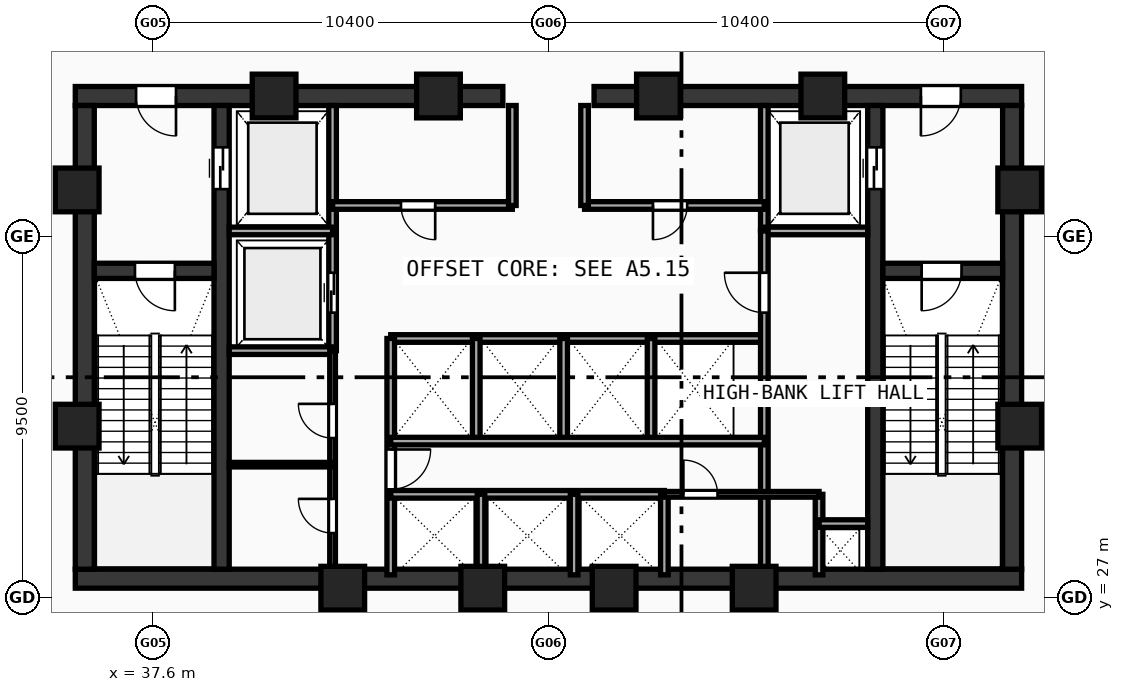
"""IFC4 building model, lengths in metres.
Left out: names, types, materials, properties, quantities, classifications, styles, units other than length and angle.
Written with IfcOpenShell. Run it as: python <this file> out.ifc"""

import sys

from ifc_helpers import new_model, si_unit, direction, frame, frame_2d, origin, origin_with_axes, origin_2d, place, context, subcontext, project, spatial, rectangle, hollow_rectangle, extrude, source, transform, mapped, element, fill, save


model = new_model("IFC4")
c1 = context("Model", 3, precision=1e-05, world=origin(), true_north=direction((0.0, 1.0)))
c2 = subcontext(c1, "Body", "Model", "MODEL_VIEW")
j1 = project(units=[si_unit("LENGTHUNIT", "METRE"), si_unit("PLANEANGLEUNIT", "RADIAN")], contexts=[c1])
p1 = place(None, origin())
s1 = spatial("IfcSite", under=j1, at=p1, CompositionType="ELEMENT")
p2 = place(p1, origin())
s2 = spatial("IfcBuilding", under=s1, at=p2, CompositionType="ELEMENT")
p3 = place(p2, frame((0.0, 0.0, 224.81)))
s3 = spatial("IfcBuildingStorey", under=s2, at=p3, CompositionType="ELEMENT", Elevation=224.81)
p4 = place(p3, frame((35.55, 27.5, 0.0), z_axis=(0.0, 0.0, 1.0), x_axis=(1.0, 0.0, 0.0)))
e1 = element("IfcWall", 1, at=p4, inside=s3, PredefinedType="SHEAR", context=c2, shape_type="SweptSolid", body=[
    extrude(rectangle(XDim=24.9, YDim=0.5, at=frame_2d((12.45, 0.0))), origin(), (0.0, 0.0, 1.0), 4.54),
])
p5 = place(p3, frame((35.55, 40.2, 0.0), z_axis=(0.0, 0.0, 1.0), x_axis=(1.0, 0.0, 0.0)))
e2 = element("IfcWall", 2, at=p5, inside=s3, PredefinedType="SHEAR", context=c2, shape_type="SweptSolid", body=[
    extrude(rectangle(XDim=11.25, YDim=0.5, at=frame_2d((5.625, 0.0))), origin(), (0.0, 0.0, 1.0), 4.54),
])
p6 = place(p5, frame((1.6, 0.0, 0.0)))
e3 = element("IfcOpeningElement", 3, at=p6, cuts=e2, PredefinedType="OPENING", context=c2, shape_type="SweptSolid", body=[
    extrude(rectangle(XDim=1.05, YDim=2.1, at=frame_2d((0.525, 1.05))), frame((0.0, 0.26, 0.0), z_axis=(0.0, -1.0, 0.0), x_axis=(1.0, 0.0, 0.0)), (0.0, 0.0, 1.0), 0.52),
])
p7 = place(p3, frame((49.2, 40.2, 0.0), z_axis=(0.0, 0.0, 1.0), x_axis=(1.0, 0.0, 0.0)))
e4 = element("IfcWall", 4, at=p7, inside=s3, PredefinedType="SHEAR", context=c2, shape_type="SweptSolid", body=[
    extrude(rectangle(XDim=11.25, YDim=0.5, at=frame_2d((5.625, 0.0))), origin(), (0.0, 0.0, 1.0), 4.54),
])
p8 = place(p7, frame((8.6, 0.0, 0.0)))
e5 = element("IfcOpeningElement", 5, at=p8, cuts=e4, PredefinedType="OPENING", context=c2, shape_type="SweptSolid", body=[
    extrude(rectangle(XDim=1.05, YDim=2.1, at=frame_2d((0.525, 1.05))), frame((0.0, 0.26, 0.0), z_axis=(0.0, -1.0, 0.0), x_axis=(1.0, 0.0, 0.0)), (0.0, 0.0, 1.0), 0.52),
])
for number, where, z_axis, x_axis in (
    (6, (35.8, 27.75, 0.0), (0.0, 0.0, 1.0), (0.0, 1.0, 0.0)),
    (7, (60.2, 27.75, 0.0), (0.0, 0.0, 1.0), (0.0, 1.0, 0.0)),
):
    element("IfcWall", number, at=place(p3, frame(where, z_axis=z_axis, x_axis=x_axis)), inside=s3, PredefinedType="SHEAR", context=c2, shape_type="SweptSolid", body=[
        extrude(rectangle(XDim=12.2, YDim=0.5, at=frame_2d((6.1, 0.0))), origin(), (0.0, 0.0, 1.0), 4.54),
    ])
p9 = place(p3, frame((39.4, 27.75, 0.0), z_axis=(0.0, 0.0, 1.0), x_axis=(0.0, 1.0, 0.0)))
e8 = element("IfcWall", 8, at=p9, inside=s3, PredefinedType="SHEAR", context=c2, shape_type="SweptSolid", body=[
    extrude(rectangle(XDim=12.2, YDim=0.4, at=frame_2d((6.1, 0.0))), origin(), (0.0, 0.0, 1.0), 4.54),
])
p10 = place(p9, frame((10.0, 0.0, 0.0)))
e9 = element("IfcOpeningElement", 9, at=p10, cuts=e8, PredefinedType="OPENING", context=c2, shape_type="SweptSolid", body=[
    extrude(rectangle(XDim=1.1, YDim=2.1, at=frame_2d((0.55, 1.05))), frame((0.0, 0.21, 0.0), z_axis=(0.0, -1.0, 0.0), x_axis=(1.0, 0.0, 0.0)), (0.0, 0.0, 1.0), 0.42),
])
p11 = place(p3, frame((56.6, 27.75, 0.0), z_axis=(0.0, 0.0, 1.0), x_axis=(0.0, 1.0, 0.0)))
e10 = element("IfcWall", 10, at=p11, inside=s3, PredefinedType="SHEAR", context=c2, shape_type="SweptSolid", body=[
    extrude(rectangle(XDim=12.2, YDim=0.4, at=frame_2d((6.1, 0.0))), origin(), (0.0, 0.0, 1.0), 4.54),
])
p12 = place(p11, frame((10.0, 0.0, 0.0)))
e11 = element("IfcOpeningElement", 11, at=p12, cuts=e10, PredefinedType="OPENING", context=c2, shape_type="SweptSolid", body=[
    extrude(rectangle(XDim=1.1, YDim=2.1, at=frame_2d((0.55, 1.05))), frame((0.0, 0.21, 0.0), z_axis=(0.0, -1.0, 0.0), x_axis=(1.0, 0.0, 0.0)), (0.0, 0.0, 1.0), 0.42),
])
p13 = place(p3, frame((36.05, 35.6, 0.0), z_axis=(0.0, 0.0, 1.0), x_axis=(1.0, 0.0, 0.0)))
e12 = element("IfcWall", 12, at=p13, inside=s3, PredefinedType="SHEAR", context=c2, shape_type="SweptSolid", body=[
    extrude(rectangle(XDim=3.15, YDim=0.4, at=frame_2d((1.575, 0.0))), origin(), (0.0, 0.0, 1.0), 4.54),
])
p14 = place(p13, frame((1.07, 0.0, 0.0)))
e13 = element("IfcOpeningElement", 13, at=p14, cuts=e12, PredefinedType="OPENING", context=c2, shape_type="SweptSolid", body=[
    extrude(rectangle(XDim=1.05, YDim=2.1, at=frame_2d((0.525, 1.05))), frame((0.0, 0.21, 0.0), z_axis=(0.0, -1.0, 0.0), x_axis=(1.0, 0.0, 0.0)), (0.0, 0.0, 1.0), 0.42),
])
p15 = place(p3, frame((56.8, 35.6, 0.0), z_axis=(0.0, 0.0, 1.0), x_axis=(1.0, 0.0, 0.0)))
e14 = element("IfcWall", 14, at=p15, inside=s3, PredefinedType="SHEAR", context=c2, shape_type="SweptSolid", body=[
    extrude(rectangle(XDim=3.15, YDim=0.4, at=frame_2d((1.575, 0.0))), origin(), (0.0, 0.0, 1.0), 4.54),
])
p16 = place(p15, frame((1.02, 0.0, 0.0)))
e15 = element("IfcOpeningElement", 15, at=p16, cuts=e14, PredefinedType="OPENING", context=c2, shape_type="SweptSolid", body=[
    extrude(rectangle(XDim=1.05, YDim=2.1, at=frame_2d((0.525, 1.05))), frame((0.0, 0.21, 0.0), z_axis=(0.0, -1.0, 0.0), x_axis=(1.0, 0.0, 0.0)), (0.0, 0.0, 1.0), 0.42),
])
m1 = source(origin(), c2, "Body", "SweptSolid", [
    extrude(hollow_rectangle(XDim=1.15, YDim=1.15, WallThickness=0.048, at=origin_2d()), origin(), (0.0, 0.0, 1.0), 4.82),
])
for number, where, z_axis, x_axis in (
    (16, (42.588, 27.25, -0.28), (0.0, 0.0, 1.0), (1.0, 0.0, 0.0)),
    (17, (46.272, 27.25, -0.28), (0.0, 0.0, 1.0), (1.0, 0.0, 0.0)),
    (18, (49.729, 27.25, -0.28), (0.0, 0.0, 1.0), (1.0, 0.0, 0.0)),
    (19, (53.412, 27.25, -0.28), (0.0, 0.0, 1.0), (1.0, 0.0, 0.0)),
    (20, (60.4, 31.513, -0.28), (0.0, 0.0, 1.0), (1.0, 0.0, 0.0)),
    (21, (60.4, 37.729, -0.28), (0.0, 0.0, 1.0), (1.0, 0.0, 0.0)),
    (22, (55.219, 40.2, -0.28), (0.0, 0.0, 1.0), (1.0, 0.0, 0.0)),
    (23, (50.894, 40.2, -0.28), (0.0, 0.0, 1.0), (1.0, 0.0, 0.0)),
    (24, (45.106, 40.2, -0.28), (0.0, 0.0, 1.0), (1.0, 0.0, 0.0)),
    (25, (40.781, 40.2, -0.28), (0.0, 0.0, 1.0), (1.0, 0.0, 0.0)),
    (26, (35.6, 37.729, -0.28), (0.0, 0.0, 1.0), (1.0, 0.0, 0.0)),
    (27, (35.6, 31.513, -0.28), (0.0, 0.0, 1.0), (1.0, 0.0, 0.0)),
):
    element("IfcColumn", number, at=place(p3, frame(where, z_axis=z_axis, x_axis=x_axis)), inside=s3, PredefinedType="COLUMN", context=c2, shape_type="MappedRepresentation", body=[
        mapped(m1, transform((0.0, 0.0, 0.0), scale=1.0)),
    ])
p17 = place(p3, frame((42.32, 33.5, 0.0), z_axis=(0.0, 0.0, 1.0), x_axis=(0.0, 1.0, 0.0)))
e28 = element("IfcWall", 28, at=p17, inside=s3, PredefinedType="SOLIDWALL", context=c2, shape_type="SweptSolid", body=[
    extrude(rectangle(XDim=6.45, YDim=0.2, at=frame_2d((3.225, 0.0))), origin(), (0.0, 0.0, 1.0), 4.54),
])
p18 = place(p17, frame((1.0, 0.0, 0.0)))
e29 = element("IfcOpeningElement", 29, at=p18, cuts=e28, PredefinedType="OPENING", context=c2, shape_type="SweptSolid", body=[
    extrude(rectangle(XDim=1.05, YDim=2.1, at=frame_2d((0.525, 1.05))), frame((0.0, 0.11, 0.0), z_axis=(0.0, -1.0, 0.0), x_axis=(1.0, 0.0, 0.0)), (0.0, 0.0, 1.0), 0.22),
])
for number, where, z_axis, x_axis in (
    (30, (39.6, 36.65, 0.0), (0.0, 0.0, 1.0), (1.0, 0.0, 0.0)),
    (31, (39.6, 33.5, 0.0), (0.0, 0.0, 1.0), (1.0, 0.0, 0.0)),
):
    element("IfcWall", number, at=place(p3, frame(where, z_axis=z_axis, x_axis=x_axis)), inside=s3, PredefinedType="SOLIDWALL", context=c2, shape_type="SweptSolid", body=[
        extrude(rectangle(XDim=2.72, YDim=0.2, at=frame_2d((1.36, 0.0))), origin(), (0.0, 0.0, 1.0), 4.54),
    ])
p19 = place(p3, frame((53.68, 36.65, 0.0), z_axis=(0.0, 0.0, 1.0), x_axis=(0.0, 1.0, 0.0)))
e32 = element("IfcWall", 32, at=p19, inside=s3, PredefinedType="SOLIDWALL", context=c2, shape_type="SweptSolid", body=[
    extrude(rectangle(XDim=3.3, YDim=0.2, at=frame_2d((1.65, 0.0))), origin(), (0.0, 0.0, 1.0), 4.54),
])
p20 = place(p3, frame((53.68, 36.65, 0.0), z_axis=(0.0, 0.0, 1.0), x_axis=(1.0, 0.0, 0.0)))
e33 = element("IfcWall", 33, at=p20, inside=s3, PredefinedType="SOLIDWALL", context=c2, shape_type="SweptSolid", body=[
    extrude(rectangle(XDim=2.72, YDim=0.2, at=frame_2d((1.36, 0.0))), origin(), (0.0, 0.0, 1.0), 4.54),
])
p21 = place(p3, frame((42.32, 37.32, 0.0), z_axis=(0.0, 0.0, 1.0), x_axis=(1.0, 0.0, 0.0)))
e34 = element("IfcWall", 34, at=p21, inside=s3, PredefinedType="SOLIDWALL", context=c2, shape_type="SweptSolid", body=[
    extrude(rectangle(XDim=4.73, YDim=0.2, at=frame_2d((2.365, 0.0))), origin(), (0.0, 0.0, 1.0), 4.54),
])
p22 = place(p21, frame((1.8, 0.0, 0.0)))
e35 = element("IfcOpeningElement", 35, at=p22, cuts=e34, PredefinedType="OPENING", context=c2, shape_type="SweptSolid", body=[
    extrude(rectangle(XDim=0.9, YDim=2.1, at=frame_2d((0.45, 1.05))), frame((0.0, 0.11, 0.0), z_axis=(0.0, -1.0, 0.0), x_axis=(1.0, 0.0, 0.0)), (0.0, 0.0, 1.0), 0.22),
])
p23 = place(p3, frame((48.95, 37.32, 0.0), z_axis=(0.0, 0.0, 1.0), x_axis=(1.0, 0.0, 0.0)))
e36 = element("IfcWall", 36, at=p23, inside=s3, PredefinedType="SOLIDWALL", context=c2, shape_type="SweptSolid", body=[
    extrude(rectangle(XDim=4.73, YDim=0.2, at=frame_2d((2.365, 0.0))), origin(), (0.0, 0.0, 1.0), 4.54),
])
p24 = place(p23, frame((1.8, 0.0, 0.0)))
e37 = element("IfcOpeningElement", 37, at=p24, cuts=e36, PredefinedType="OPENING", context=c2, shape_type="SweptSolid", body=[
    extrude(rectangle(XDim=0.9, YDim=2.1, at=frame_2d((0.45, 1.05))), frame((0.0, 0.11, 0.0), z_axis=(0.0, -1.0, 0.0), x_axis=(1.0, 0.0, 0.0)), (0.0, 0.0, 1.0), 0.22),
])
for number, where, z_axis, x_axis in (
    (38, (47.05, 37.32, 0.0), (0.0, 0.0, 1.0), (0.0, 1.0, 0.0)),
    (39, (48.95, 37.32, 0.0), (0.0, 0.0, 1.0), (0.0, 1.0, 0.0)),
):
    element("IfcWall", number, at=place(p3, frame(where, z_axis=z_axis, x_axis=x_axis)), inside=s3, PredefinedType="SOLIDWALL", context=c2, shape_type="SweptSolid", body=[
        extrude(rectangle(XDim=2.63, YDim=0.2, at=frame_2d((1.315, 0.0))), origin(), (0.0, 0.0, 1.0), 4.54),
    ])
p25 = place(p3, frame((43.85, 33.82, 0.0), z_axis=(0.0, 0.0, 1.0), x_axis=(1.0, 0.0, 0.0)))
e40 = element("IfcWall", 40, at=p25, inside=s3, PredefinedType="SOLIDWALL", context=c2, shape_type="SweptSolid", body=[
    extrude(rectangle(XDim=9.83, YDim=0.2, at=frame_2d((4.915, 0.0))), origin(), (0.0, 0.0, 1.0), 4.54),
])
p26 = place(p3, frame((43.85, 27.6, 0.0), z_axis=(0.0, 0.0, 1.0), x_axis=(0.0, 1.0, 0.0)))
e41 = element("IfcWall", 41, at=p26, inside=s3, PredefinedType="SOLIDWALL", context=c2, shape_type="SweptSolid", body=[
    extrude(rectangle(XDim=6.22, YDim=0.2, at=frame_2d((3.11, 0.0))), origin(), (0.0, 0.0, 1.0), 4.54),
])
p27 = place(p26, frame((2.25, 0.0, 0.0)))
e42 = element("IfcOpeningElement", 42, at=p27, cuts=e41, PredefinedType="OPENING", context=c2, shape_type="SweptSolid", body=[
    extrude(rectangle(XDim=1.05, YDim=2.1, at=frame_2d((0.525, 1.05))), frame((0.0, 0.11, 0.0), z_axis=(0.0, -1.0, 0.0), x_axis=(1.0, 0.0, 0.0)), (0.0, 0.0, 1.0), 0.22),
])
p28 = place(p3, frame((53.68, 27.6, 0.0), z_axis=(0.0, 0.0, 1.0), x_axis=(0.0, 1.0, 0.0)))
e43 = element("IfcWall", 43, at=p28, inside=s3, PredefinedType="SOLIDWALL", context=c2, shape_type="SweptSolid", body=[
    extrude(rectangle(XDim=9.05, YDim=0.2, at=frame_2d((4.525, 0.0))), origin(), (0.0, 0.0, 1.0), 4.54),
])
p29 = place(p28, frame((6.9, 0.0, 0.0)))
e44 = element("IfcOpeningElement", 44, at=p29, cuts=e43, PredefinedType="OPENING", context=c2, shape_type="SweptSolid", body=[
    extrude(rectangle(XDim=1.05, YDim=2.1, at=frame_2d((0.525, 1.05))), frame((0.0, 0.11, 0.0), z_axis=(0.0, -1.0, 0.0), x_axis=(1.0, 0.0, 0.0)), (0.0, 0.0, 1.0), 0.22),
])
for number, where, z_axis, x_axis in (
    (45, (46.1, 31.12, 0.0), (0.0, 0.0, 1.0), (0.0, 1.0, 0.0)),
    (46, (48.4, 31.12, 0.0), (0.0, 0.0, 1.0), (0.0, 1.0, 0.0)),
    (47, (50.7, 31.12, 0.0), (0.0, 0.0, 1.0), (0.0, 1.0, 0.0)),
):
    element("IfcWall", number, at=place(p3, frame(where, z_axis=z_axis, x_axis=x_axis)), inside=s3, PredefinedType="SOLIDWALL", context=c2, shape_type="SweptSolid", body=[
        extrude(rectangle(XDim=2.7, YDim=0.2, at=frame_2d((1.35, 0.0))), origin(), (0.0, 0.0, 1.0), 4.54),
    ])
p30 = place(p3, frame((43.85, 29.72, 0.0), z_axis=(0.0, 0.0, 1.0), x_axis=(1.0, 0.0, 0.0)))
e48 = element("IfcWall", 48, at=p30, inside=s3, PredefinedType="SOLIDWALL", context=c2, shape_type="SweptSolid", body=[
    extrude(rectangle(XDim=7.2, YDim=0.2, at=frame_2d((3.6, 0.0))), origin(), (0.0, 0.0, 1.0), 4.54),
])
p31 = place(p3, frame((51.05, 27.6, 0.0), z_axis=(0.0, 0.0, 1.0), x_axis=(0.0, 1.0, 0.0)))
e49 = element("IfcWall", 49, at=p31, inside=s3, PredefinedType="SOLIDWALL", context=c2, shape_type="SweptSolid", body=[
    extrude(rectangle(XDim=2.12, YDim=0.2, at=frame_2d((1.06, 0.0))), origin(), (0.0, 0.0, 1.0), 4.54),
])
p32 = place(p3, frame((43.85, 31.12, 0.0), z_axis=(0.0, 0.0, 1.0), x_axis=(1.0, 0.0, 0.0)))
e50 = element("IfcWall", 50, at=p32, inside=s3, PredefinedType="SOLIDWALL", context=c2, shape_type="SweptSolid", body=[
    extrude(rectangle(XDim=9.83, YDim=0.2, at=frame_2d((4.915, 0.0))), origin(), (0.0, 0.0, 1.0), 4.54),
])
for number, where, z_axis, x_axis in (
    (51, (46.225, 27.6, 0.0), (0.0, 0.0, 1.0), (0.0, 1.0, 0.0)),
    (52, (48.675, 27.6, 0.0), (0.0, 0.0, 1.0), (0.0, 1.0, 0.0)),
    (53, (55.12, 27.6, 0.0), (0.0, 0.0, 1.0), (0.0, 1.0, 0.0)),
):
    element("IfcWall", number, at=place(p3, frame(where, z_axis=z_axis, x_axis=x_axis)), inside=s3, PredefinedType="SOLIDWALL", context=c2, shape_type="SweptSolid", body=[
        extrude(rectangle(XDim=2.12, YDim=0.2, at=frame_2d((1.06, 0.0))), origin(), (0.0, 0.0, 1.0), 4.54),
    ])
p33 = place(p3, frame((55.12, 28.95, 0.0), z_axis=(0.0, 0.0, 1.0), x_axis=(1.0, 0.0, 0.0)))
e54 = element("IfcWall", 54, at=p33, inside=s3, PredefinedType="SOLIDWALL", context=c2, shape_type="SweptSolid", body=[
    extrude(rectangle(XDim=1.28, YDim=0.2, at=frame_2d((0.64, 0.0))), origin(), (0.0, 0.0, 1.0), 4.54),
])
p34 = place(p3, frame((42.32, 27.6, 0.0), z_axis=(0.0, 0.0, 1.0), x_axis=(0.0, 1.0, 0.0)))
e55 = element("IfcWall", 55, at=p34, inside=s3, PredefinedType="PARTITIONING", context=c2, shape_type="SweptSolid", body=[
    extrude(rectangle(XDim=5.9, YDim=0.15, at=frame_2d((2.95, 0.0))), origin(), (0.0, 0.0, 1.0), 4.54),
])
p35 = place(p34, frame((1.1, 0.0, 0.0)))
e56 = element("IfcOpeningElement", 56, at=p35, cuts=e55, PredefinedType="OPENING", context=c2, shape_type="SweptSolid", body=[
    extrude(rectangle(XDim=0.9, YDim=2.1, at=frame_2d((0.45, 1.05))), frame((0.0, 0.085, 0.0), z_axis=(0.0, -1.0, 0.0), x_axis=(1.0, 0.0, 0.0)), (0.0, 0.0, 1.0), 0.17),
])
p36 = place(p34, frame((3.6, 0.0, 0.0)))
e57 = element("IfcOpeningElement", 57, at=p36, cuts=e55, PredefinedType="OPENING", context=c2, shape_type="SweptSolid", body=[
    extrude(rectangle(XDim=0.9, YDim=2.1, at=frame_2d((0.45, 1.05))), frame((0.0, 0.085, 0.0), z_axis=(0.0, -1.0, 0.0), x_axis=(1.0, 0.0, 0.0)), (0.0, 0.0, 1.0), 0.17),
])
p37 = place(p3, frame((51.05, 29.72, 0.0), z_axis=(0.0, 0.0, 1.0), x_axis=(1.0, 0.0, 0.0)))
e58 = element("IfcWall", 58, at=p37, inside=s3, PredefinedType="PARTITIONING", context=c2, shape_type="SweptSolid", body=[
    extrude(rectangle(XDim=4.07, YDim=0.15, at=frame_2d((2.035, 0.0))), origin(), (0.0, 0.0, 1.0), 4.54),
])
p38 = place(p37, frame((0.5, 0.0, 0.0)))
e59 = element("IfcOpeningElement", 59, at=p38, cuts=e58, PredefinedType="OPENING", context=c2, shape_type="SweptSolid", body=[
    extrude(rectangle(XDim=0.9, YDim=2.1, at=frame_2d((0.45, 1.05))), frame((0.0, 0.085, 0.0), z_axis=(0.0, -1.0, 0.0), x_axis=(1.0, 0.0, 0.0)), (0.0, 0.0, 1.0), 0.17),
])
p39 = place(p3, frame((39.6, 30.5, 0.0), z_axis=(0.0, 0.0, 1.0), x_axis=(1.0, 0.0, 0.0)))
e60 = element("IfcWall", 60, at=p39, inside=s3, PredefinedType="PARTITIONING", context=c2, shape_type="SweptSolid", body=[
    extrude(rectangle(XDim=2.72, YDim=0.12, at=frame_2d((1.36, 0.0))), origin(), (0.0, 0.0, 1.0), 4.54),
])
m2 = source(origin(), c2, "Body", "SweptSolid", [
    extrude(rectangle(XDim=1.05, YDim=2.1, at=frame_2d((0.525, 1.05))), frame((0.0, 0.025, 0.0), z_axis=(0.0, -1.0, 0.0), x_axis=(1.0, 0.0, 0.0)), (0.0, 0.0, 1.0), 0.05),
])
p40 = place(p14, frame((1.05, 0.0, 0.0), z_axis=(0.0, 0.0, 1.0), x_axis=(-1.0, 0.0, 0.0)))
e61 = element("IfcDoor", 61, at=p40, inside=s3, OperationType="SINGLE_SWING_LEFT", PredefinedType="DOOR", context=c2, shape_type="MappedRepresentation", body=[
    mapped(m2, transform((0.0, 0.0, 0.0), scale=1.0)),
])
fill(e13, e61)
p41 = place(p16, frame((1.05, 0.0, 0.0), z_axis=(0.0, 0.0, 1.0), x_axis=(-1.0, 0.0, 0.0)))
e62 = element("IfcDoor", 62, at=p41, inside=s3, OperationType="SINGLE_SWING_RIGHT", PredefinedType="DOOR", context=c2, shape_type="MappedRepresentation", body=[
    mapped(m2, transform((0.0, 0.0, 0.0), scale=1.0)),
])
fill(e15, e62)
p42 = place(p6, frame((1.05, 0.0, 0.0), z_axis=(0.0, 0.0, 1.0), x_axis=(-1.0, 0.0, 0.0)))
e63 = element("IfcDoor", 63, at=p42, inside=s3, OperationType="SINGLE_SWING_LEFT", PredefinedType="DOOR", context=c2, shape_type="MappedRepresentation", body=[
    mapped(m2, transform((0.0, 0.0, 0.0), scale=1.0)),
])
fill(e3, e63)
p43 = place(p8, frame((1.05, 0.0, 0.0), z_axis=(0.0, 0.0, 1.0), x_axis=(-1.0, 0.0, 0.0)))
e64 = element("IfcDoor", 64, at=p43, inside=s3, OperationType="SINGLE_SWING_RIGHT", PredefinedType="DOOR", context=c2, shape_type="MappedRepresentation", body=[
    mapped(m2, transform((0.0, 0.0, 0.0), scale=1.0)),
])
fill(e5, e64)
m3 = source(origin(), c2, "Body", "SweptSolid", [
    extrude(rectangle(XDim=1.1, YDim=2.1, at=frame_2d((0.55, 1.05))), frame((0.0, 0.025, 0.0), z_axis=(0.0, -1.0, 0.0), x_axis=(1.0, 0.0, 0.0)), (0.0, 0.0, 1.0), 0.05),
])
p44 = place(p10, frame((1.1, 0.0, 0.0), z_axis=(0.0, 0.0, 1.0), x_axis=(-1.0, 0.0, 0.0)))
e65 = element("IfcDoor", 65, at=p44, inside=s3, OperationType="DOUBLE_DOOR_SLIDING", PredefinedType="DOOR", context=c2, shape_type="MappedRepresentation", body=[
    mapped(m3, transform((0.0, 0.0, 0.0), scale=1.0)),
])
fill(e9, e65)
p45 = place(p12, origin_with_axes())
e66 = element("IfcDoor", 66, at=p45, inside=s3, OperationType="DOUBLE_DOOR_SLIDING", PredefinedType="DOOR", context=c2, shape_type="MappedRepresentation", body=[
    mapped(m3, transform((0.0, 0.0, 0.0), scale=1.0)),
])
fill(e11, e66)
p46 = place(p18, origin_with_axes())
e67 = element("IfcDoor", 67, at=p46, inside=s3, OperationType="DOUBLE_DOOR_SLIDING", PredefinedType="DOOR", context=c2, shape_type="MappedRepresentation", body=[
    mapped(m2, transform((0.0, 0.0, 0.0), scale=1.0)),
])
fill(e29, e67)
m4 = source(origin(), c2, "Body", "SweptSolid", [
    extrude(rectangle(XDim=0.9, YDim=2.1, at=frame_2d((0.45, 1.05))), frame((0.0, 0.025, 0.0), z_axis=(0.0, -1.0, 0.0), x_axis=(1.0, 0.0, 0.0)), (0.0, 0.0, 1.0), 0.05),
])
p47 = place(p22, frame((0.9, 0.0, 0.0), z_axis=(0.0, 0.0, 1.0), x_axis=(-1.0, 0.0, 0.0)))
e68 = element("IfcDoor", 68, at=p47, inside=s3, OperationType="SINGLE_SWING_LEFT", PredefinedType="DOOR", context=c2, shape_type="MappedRepresentation", body=[
    mapped(m4, transform((0.0, 0.0, 0.0), scale=1.0)),
])
fill(e35, e68)
p48 = place(p24, frame((0.9, 0.0, 0.0), z_axis=(0.0, 0.0, 1.0), x_axis=(-1.0, 0.0, 0.0)))
e69 = element("IfcDoor", 69, at=p48, inside=s3, OperationType="SINGLE_SWING_RIGHT", PredefinedType="DOOR", context=c2, shape_type="MappedRepresentation", body=[
    mapped(m4, transform((0.0, 0.0, 0.0), scale=1.0)),
])
fill(e37, e69)
p49 = place(p27, frame((1.05, 0.0, 0.0), z_axis=(0.0, 0.0, 1.0), x_axis=(-1.0, 0.0, 0.0)))
e70 = element("IfcDoor", 70, at=p49, inside=s3, OperationType="SINGLE_SWING_LEFT", PredefinedType="DOOR", context=c2, shape_type="MappedRepresentation", body=[
    mapped(m2, transform((0.0, 0.0, 0.0), scale=1.0)),
])
fill(e42, e70)
p50 = place(p29, origin_with_axes())
e71 = element("IfcDoor", 71, at=p50, inside=s3, OperationType="SINGLE_SWING_RIGHT", PredefinedType="DOOR", context=c2, shape_type="MappedRepresentation", body=[
    mapped(m2, transform((0.0, 0.0, 0.0), scale=1.0)),
])
fill(e44, e71)
p51 = place(p35, origin_with_axes())
e72 = element("IfcDoor", 72, at=p51, inside=s3, OperationType="SINGLE_SWING_RIGHT", PredefinedType="DOOR", context=c2, shape_type="MappedRepresentation", body=[
    mapped(m4, transform((0.0, 0.0, 0.0), scale=1.0)),
])
fill(e56, e72)
p52 = place(p36, origin_with_axes())
e73 = element("IfcDoor", 73, at=p52, inside=s3, OperationType="SINGLE_SWING_RIGHT", PredefinedType="DOOR", context=c2, shape_type="MappedRepresentation", body=[
    mapped(m4, transform((0.0, 0.0, 0.0), scale=1.0)),
])
fill(e57, e73)
p53 = place(p38, origin_with_axes())
e74 = element("IfcDoor", 74, at=p53, inside=s3, OperationType="SINGLE_SWING_LEFT", PredefinedType="DOOR", context=c2, shape_type="MappedRepresentation", body=[
    mapped(m4, transform((0.0, 0.0, 0.0), scale=1.0)),
])
fill(e59, e74)
save(model, sys.argv[1])
